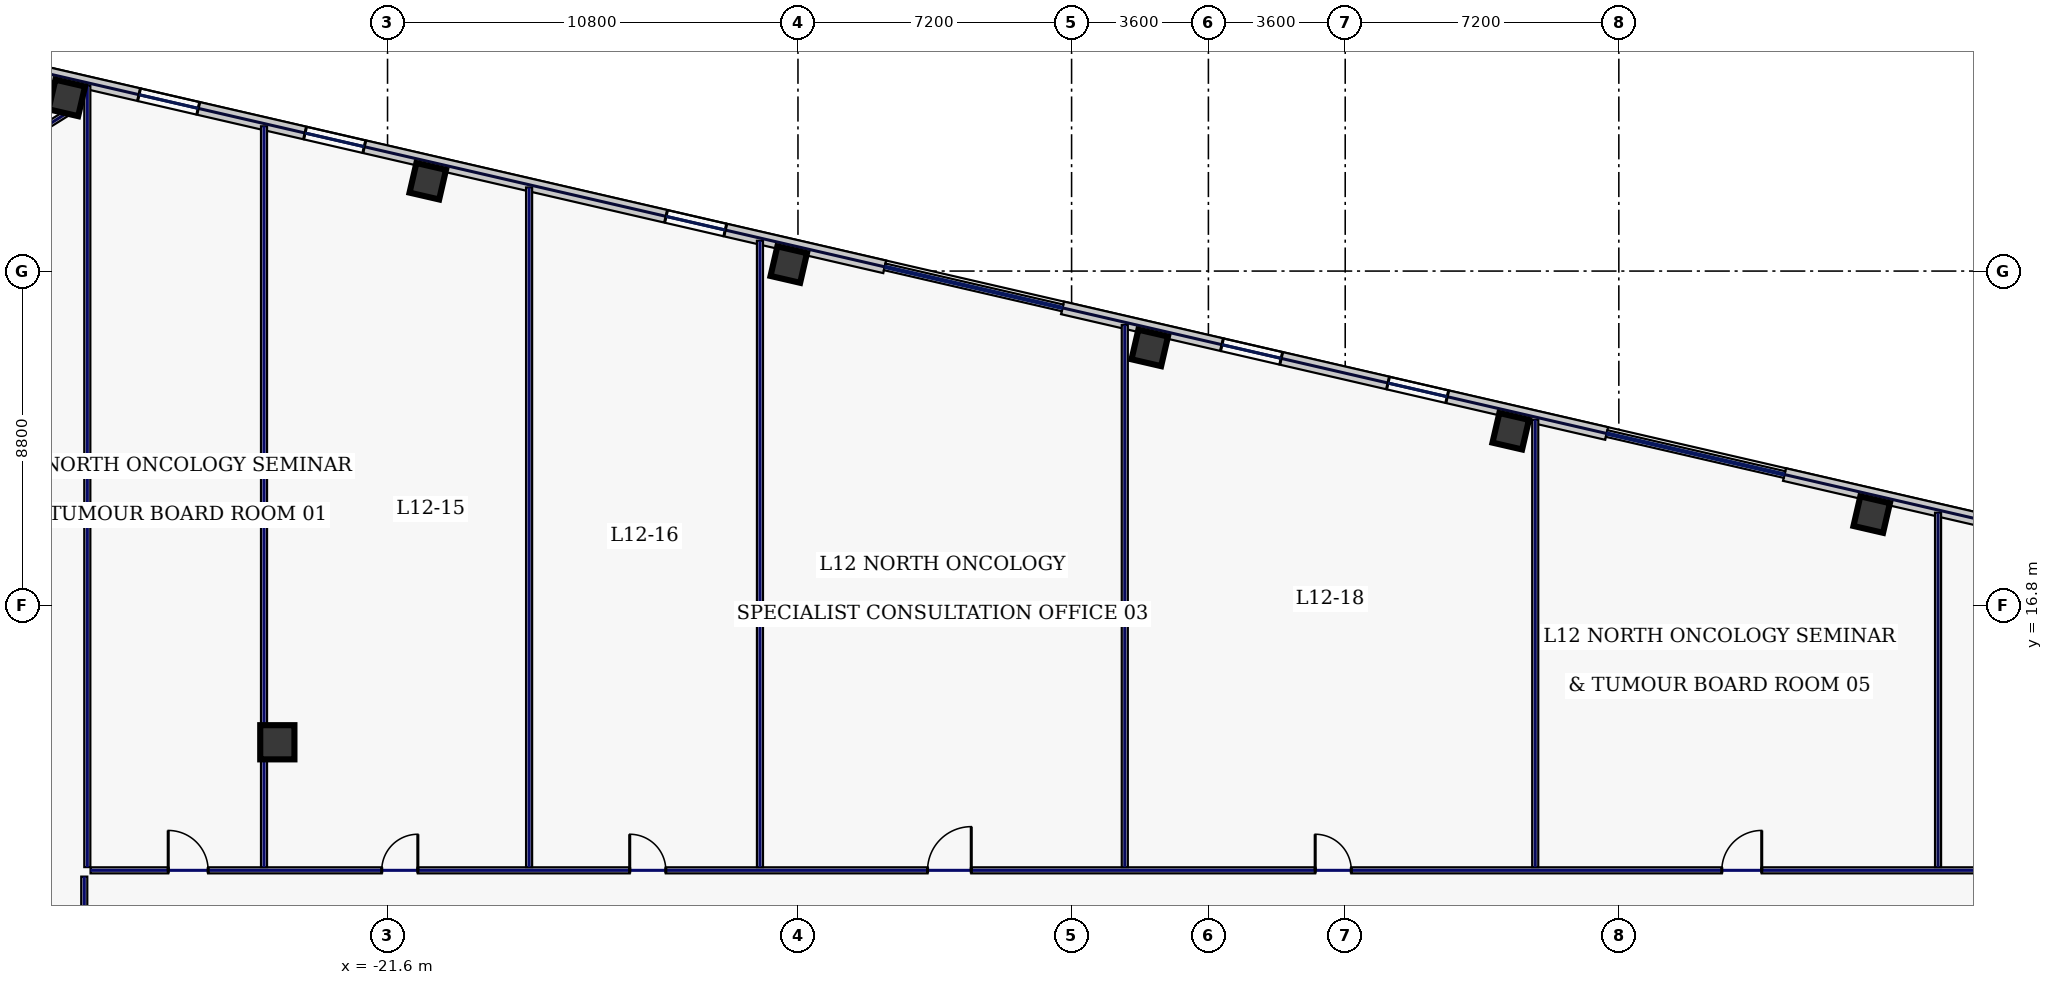
"""IFC4 building model, lengths in metres.
Left out: names, types, materials, properties, quantities, classifications, styles, units other than length and angle.
Written with IfcOpenShell. Run it as: python <this file> out.ifc"""

import sys

from ifc_helpers import new_model, si_unit, direction, frame, frame_2d, origin, origin_2d, place, context, subcontext, project, spatial, rectangle, hollow_rectangle, extrude, element, fill, save


model = new_model("IFC4")
c1 = context("Model", 3, precision=1e-05, world=origin(), true_north=direction((0.0, 1.0)))
c2 = subcontext(c1, "Body", "Model", "MODEL_VIEW")
j1 = project(units=[si_unit("LENGTHUNIT", "METRE"), si_unit("PLANEANGLEUNIT", "RADIAN")], contexts=[c1])
p1 = place(None, origin())
s1 = spatial("IfcSite", under=j1, at=p1, CompositionType="ELEMENT")
p2 = place(p1, origin())
s2 = spatial("IfcBuilding", under=s1, at=p2, CompositionType="ELEMENT")
p3 = place(p2, frame((0.0, 0.0, 59.4)))
s3 = spatial("IfcBuildingStorey", under=s2, at=p3, CompositionType="ELEMENT", Elevation=59.4)
p4 = place(p3, frame((-24.5, 13.2, 0.0), z_axis=(0.0, 0.0, 1.0), x_axis=(1.0, 0.0, 0.0)))
e1 = element("IfcColumn", 1, at=p4, inside=s3, PredefinedType="COLUMN", context=c2, shape_type="SweptSolid", body=[
    extrude(hollow_rectangle(XDim=0.9, YDim=0.9, WallThickness=0.04, at=origin_2d()), origin(), (0.0, 0.0, 1.0), 3.74),
])
for number, where, z_axis, x_axis in (
    (2, (17.454, 19.192, 0.0), (0.0, 0.0, 1.0), (0.974, -0.225, 0.0)),
    (3, (7.955, 21.385, 0.0), (0.0, 0.0, 1.0), (0.974, -0.225, 0.0)),
    (4, (-1.544, 23.578, 0.0), (0.0, 0.0, 1.0), (0.974, -0.225, 0.0)),
    (5, (-11.042, 25.771, 0.0), (0.0, 0.0, 1.0), (0.974, -0.225, 0.0)),
    (6, (-20.541, 27.964, 0.0), (0.0, 0.0, 1.0), (0.974, -0.225, 0.0)),
    (7, (-30.04, 30.156, 0.0), (0.0, 0.0, 1.0), (0.974, -0.225, 0.0)),
):
    element("IfcColumn", number, at=place(p3, frame(where, z_axis=z_axis, x_axis=x_axis)), inside=s3, PredefinedType="COLUMN", context=c2, shape_type="SweptSolid", body=[
        extrude(hollow_rectangle(XDim=0.8, YDim=0.8, WallThickness=0.036, at=origin_2d()), origin(), (0.0, 0.0, 1.0), 3.74),
    ])
p5 = place(p3, frame((37.229, 15.15, 0.0), z_axis=(0.0, 0.0, 1.0), x_axis=(-0.97436993772, 0.224951604723, 0.0)))
e8 = element("IfcWall", 8, at=p5, inside=s3, PredefinedType="STANDARD", context=c2, shape_type="SweptSolid", body=[
    extrude(rectangle(XDim=22.651, YDim=0.34, at=frame_2d((11.326, 0.0))), origin(), (0.0, 0.0, 1.0), 3.74),
])
p6 = place(p5, frame((2.512, 0.0, 0.22)))
e9 = element("IfcOpeningElement", 9, at=p6, cuts=e8, PredefinedType="OPENING", context=c2, shape_type="SweptSolid", body=[
    extrude(rectangle(XDim=1.6, YDim=1.2, at=frame_2d((0.8, 0.6))), frame((0.0, 0.18, 0.0), z_axis=(0.0, -1.0, 0.0), x_axis=(1.0, 0.0, 0.0)), (0.0, 0.0, 1.0), 0.36),
])
p7 = place(p3, frame((10.481, 21.325, 0.0), z_axis=(0.0, 0.0, 1.0), x_axis=(-0.974369353393, 0.2249541357, 0.0)))
e10 = element("IfcWall", 10, at=p7, inside=s3, PredefinedType="STANDARD", context=c2, shape_type="SweptSolid", body=[
    extrude(rectangle(XDim=14.697, YDim=0.34, at=frame_2d((7.349, 0.0))), origin(), (0.0, 0.0, 1.0), 3.74),
])
p8 = place(p7, frame((8.791, 0.0, 0.22)))
e11 = element("IfcOpeningElement", 11, at=p8, cuts=e10, PredefinedType="OPENING", context=c2, shape_type="SweptSolid", body=[
    extrude(rectangle(XDim=1.6, YDim=1.2, at=frame_2d((0.8, 0.6))), frame((0.0, 0.18, 0.0), z_axis=(0.0, -1.0, 0.0), x_axis=(1.0, 0.0, 0.0)), (0.0, 0.0, 1.0), 0.36),
])
p9 = place(p7, frame((4.306, 0.0, 0.22)))
e12 = element("IfcOpeningElement", 12, at=p9, cuts=e10, PredefinedType="OPENING", context=c2, shape_type="SweptSolid", body=[
    extrude(rectangle(XDim=1.6, YDim=1.2, at=frame_2d((0.8, 0.6))), frame((0.0, 0.18, 0.0), z_axis=(0.0, -1.0, 0.0), x_axis=(1.0, 0.0, 0.0)), (0.0, 0.0, 1.0), 0.36),
])
p10 = place(p3, frame((-8.517, 25.711, 0.0), z_axis=(0.0, 0.0, 1.0), x_axis=(-0.974372845456, 0.224939009598, 0.0)))
e13 = element("IfcWall", 13, at=p10, inside=s3, PredefinedType="STANDARD", context=c2, shape_type="SweptSolid", body=[
    extrude(rectangle(XDim=22.652, YDim=0.34, at=frame_2d((11.326, 0.0))), origin(), (0.0, 0.0, 1.0), 3.74),
])
p11 = place(p10, frame((18.539, 0.0, 0.22)))
e14 = element("IfcOpeningElement", 14, at=p11, cuts=e13, PredefinedType="OPENING", context=c2, shape_type="SweptSolid", body=[
    extrude(rectangle(XDim=1.6, YDim=1.2, at=frame_2d((0.8, 0.6))), frame((0.0, 0.18, 0.0), z_axis=(0.0, -1.0, 0.0), x_axis=(1.0, 0.0, 0.0)), (0.0, 0.0, 1.0), 0.36),
])
p12 = place(p10, frame((14.055, 0.0, 0.22)))
e15 = element("IfcOpeningElement", 15, at=p12, cuts=e13, PredefinedType="OPENING", context=c2, shape_type="SweptSolid", body=[
    extrude(rectangle(XDim=1.6, YDim=1.2, at=frame_2d((0.8, 0.6))), frame((0.0, 0.18, 0.0), z_axis=(0.0, -1.0, 0.0), x_axis=(1.0, 0.0, 0.0)), (0.0, 0.0, 1.0), 0.36),
])
p13 = place(p10, frame((4.306, 0.0, 0.22)))
e16 = element("IfcOpeningElement", 16, at=p13, cuts=e13, PredefinedType="OPENING", context=c2, shape_type="SweptSolid", body=[
    extrude(rectangle(XDim=1.6, YDim=1.2, at=frame_2d((0.8, 0.6))), frame((0.0, 0.18, 0.0), z_axis=(0.0, -1.0, 0.0), x_axis=(1.0, 0.0, 0.0)), (0.0, 0.0, 1.0), 0.36),
])
p14 = place(p3, frame((-29.86, 29.868, 0.0), z_axis=(0.0, 0.0, 1.0), x_axis=(-0.848043064089, -0.529927317139, 0.0)))
e17 = element("IfcWall", 17, at=p14, inside=s3, PredefinedType="PARTITIONING", context=c2, shape_type="SweptSolid", body=[
    extrude(rectangle(XDim=7.354, YDim=0.16, at=frame_2d((3.677, 0.0))), origin(), (0.0, 0.0, 1.0), 1.535),
])
p15 = place(p3, frame((-29.58, -9.615, 0.0), z_axis=(0.0, 0.0, 1.0), x_axis=(0.0, 1.0, 0.0)))
e18 = element("IfcWall", 18, at=p15, inside=s3, PredefinedType="PARTITIONING", context=c2, shape_type="SweptSolid", body=[
    extrude(rectangle(XDim=19.28, YDim=0.16, at=frame_2d((9.64, 0.0))), origin(), (0.0, 0.0, 1.0), 3.74),
])
p16 = place(p15, frame((1.969, 0.0, 0.0)))
e19 = element("IfcOpeningElement", 19, at=p16, cuts=e18, PredefinedType="OPENING", context=c2, shape_type="SweptSolid", body=[
    extrude(rectangle(XDim=0.95, YDim=2.2, at=frame_2d((0.475, 1.1))), frame((0.0, 0.09, 0.0), z_axis=(0.0, -1.0, 0.0), x_axis=(1.0, 0.0, 0.0)), (0.0, 0.0, 1.0), 0.18),
])
p17 = place(p15, frame((6.625, 0.0, 0.0)))
e20 = element("IfcOpeningElement", 20, at=p17, cuts=e18, PredefinedType="OPENING", context=c2, shape_type="SweptSolid", body=[
    extrude(rectangle(XDim=0.95, YDim=2.2, at=frame_2d((0.475, 1.1))), frame((0.0, 0.09, 0.0), z_axis=(0.0, -1.0, 0.0), x_axis=(1.0, 0.0, 0.0)), (0.0, 0.0, 1.0), 0.18),
])
p18 = place(p15, frame((11.825, 0.0, 0.0)))
e21 = element("IfcOpeningElement", 21, at=p18, cuts=e18, PredefinedType="OPENING", context=c2, shape_type="SweptSolid", body=[
    extrude(rectangle(XDim=0.95, YDim=2.2, at=frame_2d((0.475, 1.1))), frame((0.0, 0.09, 0.0), z_axis=(0.0, -1.0, 0.0), x_axis=(1.0, 0.0, 0.0)), (0.0, 0.0, 1.0), 0.18),
])
p19 = place(p15, frame((16.506, 0.0, 0.0)))
e22 = element("IfcOpeningElement", 22, at=p19, cuts=e18, PredefinedType="OPENING", context=c2, shape_type="SweptSolid", body=[
    extrude(rectangle(XDim=0.95, YDim=2.2, at=frame_2d((0.475, 1.1))), frame((0.0, 0.09, 0.0), z_axis=(0.0, -1.0, 0.0), x_axis=(1.0, 0.0, 0.0)), (0.0, 0.0, 1.0), 0.18),
])
p20 = place(p3, frame((-29.415, 9.83, 0.0), z_axis=(0.0, 0.0, 1.0), x_axis=(1.0, 0.0, 0.0)))
e23 = element("IfcWall", 23, at=p20, inside=s3, PredefinedType="PARTITIONING", context=c2, shape_type="SweptSolid", body=[
    extrude(rectangle(XDim=58.83, YDim=0.16, at=frame_2d((29.415, 0.0))), origin(), (0.0, 0.0, 1.0), 3.74),
])
p21 = place(p20, frame((2.044, 0.0, 0.0)))
e24 = element("IfcOpeningElement", 24, at=p21, cuts=e23, PredefinedType="OPENING", context=c2, shape_type="SweptSolid", body=[
    extrude(rectangle(XDim=1.05, YDim=2.2, at=frame_2d((0.525, 1.1))), frame((0.0, 0.09, 0.0), z_axis=(0.0, -1.0, 0.0), x_axis=(1.0, 0.0, 0.0)), (0.0, 0.0, 1.0), 0.18),
])
p22 = place(p20, frame((7.663, 0.0, 0.0)))
e25 = element("IfcOpeningElement", 25, at=p22, cuts=e23, PredefinedType="OPENING", context=c2, shape_type="SweptSolid", body=[
    extrude(rectangle(XDim=0.95, YDim=2.2, at=frame_2d((0.475, 1.1))), frame((0.0, 0.09, 0.0), z_axis=(0.0, -1.0, 0.0), x_axis=(1.0, 0.0, 0.0)), (0.0, 0.0, 1.0), 0.18),
])
p23 = place(p20, frame((14.188, 0.0, 0.0)))
e26 = element("IfcOpeningElement", 26, at=p23, cuts=e23, PredefinedType="OPENING", context=c2, shape_type="SweptSolid", body=[
    extrude(rectangle(XDim=0.95, YDim=2.2, at=frame_2d((0.475, 1.1))), frame((0.0, 0.09, 0.0), z_axis=(0.0, -1.0, 0.0), x_axis=(1.0, 0.0, 0.0)), (0.0, 0.0, 1.0), 0.18),
])
p24 = place(p20, frame((22.025, 0.0, 0.0)))
e27 = element("IfcOpeningElement", 27, at=p24, cuts=e23, PredefinedType="OPENING", context=c2, shape_type="SweptSolid", body=[
    extrude(rectangle(XDim=1.15, YDim=2.2, at=frame_2d((0.575, 1.1))), frame((0.0, 0.09, 0.0), z_axis=(0.0, -1.0, 0.0), x_axis=(1.0, 0.0, 0.0)), (0.0, 0.0, 1.0), 0.18),
])
p25 = place(p20, frame((32.225, 0.0, 0.0)))
e28 = element("IfcOpeningElement", 28, at=p25, cuts=e23, PredefinedType="OPENING", context=c2, shape_type="SweptSolid", body=[
    extrude(rectangle(XDim=0.95, YDim=2.2, at=frame_2d((0.475, 1.1))), frame((0.0, 0.09, 0.0), z_axis=(0.0, -1.0, 0.0), x_axis=(1.0, 0.0, 0.0)), (0.0, 0.0, 1.0), 0.18),
])
p26 = place(p20, frame((42.925, 0.0, 0.0)))
e29 = element("IfcOpeningElement", 29, at=p26, cuts=e23, PredefinedType="OPENING", context=c2, shape_type="SweptSolid", body=[
    extrude(rectangle(XDim=1.05, YDim=2.2, at=frame_2d((0.525, 1.1))), frame((0.0, 0.09, 0.0), z_axis=(0.0, -1.0, 0.0), x_axis=(1.0, 0.0, 0.0)), (0.0, 0.0, 1.0), 0.18),
])
p27 = place(p20, frame((51.65, 0.0, 0.0)))
e30 = element("IfcOpeningElement", 30, at=p27, cuts=e23, PredefinedType="OPENING", context=c2, shape_type="SweptSolid", body=[
    extrude(rectangle(XDim=0.95, YDim=2.2, at=frame_2d((0.475, 1.1))), frame((0.0, 0.09, 0.0), z_axis=(0.0, -1.0, 0.0), x_axis=(1.0, 0.0, 0.0)), (0.0, 0.0, 1.0), 0.18),
])
p28 = place(p20, frame((56.006, 0.0, 0.0)))
e31 = element("IfcOpeningElement", 31, at=p28, cuts=e23, PredefinedType="OPENING", context=c2, shape_type="SweptSolid", body=[
    extrude(rectangle(XDim=0.95, YDim=2.2, at=frame_2d((0.475, 1.1))), frame((0.0, 0.09, 0.0), z_axis=(0.0, -1.0, 0.0), x_axis=(1.0, 0.0, 0.0)), (0.0, 0.0, 1.0), 0.18),
])
p29 = place(p3, frame((-29.5, 9.915, 0.0), z_axis=(0.0, 0.0, 1.0), x_axis=(0.0, 1.0, 0.0)))
e32 = element("IfcWall", 32, at=p29, inside=s3, PredefinedType="PARTITIONING", context=c2, shape_type="SweptSolid", body=[
    extrude(rectangle(XDim=20.569, YDim=0.16, at=frame_2d((10.284, 0.0))), origin(), (0.0, 0.0, 1.0), 3.74),
])
p30 = place(p3, frame((-24.85, 9.915, 0.0), z_axis=(0.0, 0.0, 1.0), x_axis=(0.0, 1.0, 0.0)))
e33 = element("IfcWall", 33, at=p30, inside=s3, PredefinedType="PARTITIONING", context=c2, shape_type="SweptSolid", body=[
    extrude(rectangle(XDim=19.495, YDim=0.16, at=frame_2d((9.748, 0.0))), origin(), (0.0, 0.0, 1.0), 3.74),
])
p31 = place(p3, frame((-11.8, 9.915, 0.0), z_axis=(0.0, 0.0, 1.0), x_axis=(0.0, 1.0, 0.0)))
e34 = element("IfcWall", 34, at=p31, inside=s3, PredefinedType="PARTITIONING", context=c2, shape_type="SweptSolid", body=[
    extrude(rectangle(XDim=16.482, YDim=0.16, at=frame_2d((8.241, 0.0))), origin(), (0.0, 0.0, 1.0), 3.74),
])
p32 = place(p3, frame((-2.2, 9.915, 0.0), z_axis=(0.0, 0.0, 1.0), x_axis=(0.0, 1.0, 0.0)))
e35 = element("IfcWall", 35, at=p32, inside=s3, PredefinedType="PARTITIONING", context=c2, shape_type="SweptSolid", body=[
    extrude(rectangle(XDim=14.266, YDim=0.16, at=frame_2d((7.133, 0.0))), origin(), (0.0, 0.0, 1.0), 3.235),
])
p33 = place(p3, frame((8.6, 9.915, 0.0), z_axis=(0.0, 0.0, 1.0), x_axis=(0.0, 1.0, 0.0)))
e36 = element("IfcWall", 36, at=p33, inside=s3, PredefinedType="PARTITIONING", context=c2, shape_type="SweptSolid", body=[
    extrude(rectangle(XDim=11.772, YDim=0.16, at=frame_2d((5.886, 0.0))), origin(), (0.0, 0.0, 1.0), 3.235),
])
p34 = place(p3, frame((19.2, 9.915, 0.0), z_axis=(0.0, 0.0, 1.0), x_axis=(0.0, 1.0, 0.0)))
e37 = element("IfcWall", 37, at=p34, inside=s3, PredefinedType="PARTITIONING", context=c2, shape_type="SweptSolid", body=[
    extrude(rectangle(XDim=9.325, YDim=0.16, at=frame_2d((4.663, 0.0))), origin(), (0.0, 0.0, 1.0), 1.535),
])
p35 = place(p3, frame((-17.875, 9.915, 0.0), z_axis=(0.0, 0.0, 1.0), x_axis=(0.0, 1.0, 0.0)))
e38 = element("IfcWall", 38, at=p35, inside=s3, PredefinedType="PARTITIONING", context=c2, shape_type="SweptSolid", body=[
    extrude(rectangle(XDim=17.885, YDim=0.16, at=frame_2d((8.942, 0.0))), origin(), (0.0, 0.0, 1.0), 3.74),
])
p36 = place(p8, origin())
e39 = element("IfcWindow", 39, at=p36, inside=s3, PartitioningType="SINGLE_PANEL", PredefinedType="WINDOW", context=c2, shape_type="SweptSolid", body=[
    extrude(rectangle(XDim=1.6, YDim=1.2, at=frame_2d((0.8, 0.6))), frame((0.0, 0.03, 0.0), z_axis=(0.0, -1.0, 0.0), x_axis=(1.0, 0.0, 0.0)), (0.0, 0.0, 1.0), 0.06),
])
fill(e11, e39)
p37 = place(p9, origin())
e40 = element("IfcWindow", 40, at=p37, inside=s3, PartitioningType="SINGLE_PANEL", PredefinedType="WINDOW", context=c2, shape_type="SweptSolid", body=[
    extrude(rectangle(XDim=1.6, YDim=1.2, at=frame_2d((0.8, 0.6))), frame((0.0, 0.03, 0.0), z_axis=(0.0, -1.0, 0.0), x_axis=(1.0, 0.0, 0.0)), (0.0, 0.0, 1.0), 0.06),
])
fill(e12, e40)
p38 = place(p11, origin())
e41 = element("IfcWindow", 41, at=p38, inside=s3, PartitioningType="SINGLE_PANEL", PredefinedType="WINDOW", context=c2, shape_type="SweptSolid", body=[
    extrude(rectangle(XDim=1.6, YDim=1.2, at=frame_2d((0.8, 0.6))), frame((0.0, 0.03, 0.0), z_axis=(0.0, -1.0, 0.0), x_axis=(1.0, 0.0, 0.0)), (0.0, 0.0, 1.0), 0.06),
])
fill(e14, e41)
p39 = place(p12, origin())
e42 = element("IfcWindow", 42, at=p39, inside=s3, PartitioningType="SINGLE_PANEL", PredefinedType="WINDOW", context=c2, shape_type="SweptSolid", body=[
    extrude(rectangle(XDim=1.6, YDim=1.2, at=frame_2d((0.8, 0.6))), frame((0.0, 0.03, 0.0), z_axis=(0.0, -1.0, 0.0), x_axis=(1.0, 0.0, 0.0)), (0.0, 0.0, 1.0), 0.06),
])
fill(e15, e42)
p40 = place(p13, origin())
e43 = element("IfcWindow", 43, at=p40, inside=s3, PartitioningType="SINGLE_PANEL", PredefinedType="WINDOW", context=c2, shape_type="SweptSolid", body=[
    extrude(rectangle(XDim=1.6, YDim=1.2, at=frame_2d((0.8, 0.6))), frame((0.0, 0.03, 0.0), z_axis=(0.0, -1.0, 0.0), x_axis=(1.0, 0.0, 0.0)), (0.0, 0.0, 1.0), 0.06),
])
fill(e16, e43)
p41 = place(p21, origin())
e44 = element("IfcDoor", 44, at=p41, inside=s3, OperationType="SINGLE_SWING_LEFT", PredefinedType="DOOR", context=c2, shape_type="SweptSolid", body=[
    extrude(rectangle(XDim=1.05, YDim=2.2, at=frame_2d((0.525, 1.1))), frame((0.0, 0.025, 0.0), z_axis=(0.0, -1.0, 0.0), x_axis=(1.0, 0.0, 0.0)), (0.0, 0.0, 1.0), 0.05),
])
fill(e24, e44)
p42 = place(p22, origin())
e45 = element("IfcDoor", 45, at=p42, inside=s3, OperationType="SINGLE_SWING_RIGHT", PredefinedType="DOOR", context=c2, shape_type="SweptSolid", body=[
    extrude(rectangle(XDim=0.95, YDim=2.2, at=frame_2d((0.475, 1.1))), frame((0.0, 0.025, 0.0), z_axis=(0.0, -1.0, 0.0), x_axis=(1.0, 0.0, 0.0)), (0.0, 0.0, 1.0), 0.05),
])
fill(e25, e45)
p43 = place(p23, origin())
e46 = element("IfcDoor", 46, at=p43, inside=s3, OperationType="SINGLE_SWING_LEFT", PredefinedType="DOOR", context=c2, shape_type="SweptSolid", body=[
    extrude(rectangle(XDim=0.95, YDim=2.2, at=frame_2d((0.475, 1.1))), frame((0.0, 0.025, 0.0), z_axis=(0.0, -1.0, 0.0), x_axis=(1.0, 0.0, 0.0)), (0.0, 0.0, 1.0), 0.05),
])
fill(e26, e46)
p44 = place(p24, origin())
e47 = element("IfcDoor", 47, at=p44, inside=s3, OperationType="SINGLE_SWING_RIGHT", PredefinedType="DOOR", context=c2, shape_type="SweptSolid", body=[
    extrude(rectangle(XDim=1.15, YDim=2.2, at=frame_2d((0.575, 1.1))), frame((0.0, 0.025, 0.0), z_axis=(0.0, -1.0, 0.0), x_axis=(1.0, 0.0, 0.0)), (0.0, 0.0, 1.0), 0.05),
])
fill(e27, e47)
p45 = place(p25, origin())
e48 = element("IfcDoor", 48, at=p45, inside=s3, OperationType="SINGLE_SWING_LEFT", PredefinedType="DOOR", context=c2, shape_type="SweptSolid", body=[
    extrude(rectangle(XDim=0.95, YDim=2.2, at=frame_2d((0.475, 1.1))), frame((0.0, 0.025, 0.0), z_axis=(0.0, -1.0, 0.0), x_axis=(1.0, 0.0, 0.0)), (0.0, 0.0, 1.0), 0.05),
])
fill(e28, e48)
p46 = place(p26, origin())
e49 = element("IfcDoor", 49, at=p46, inside=s3, OperationType="SINGLE_SWING_RIGHT", PredefinedType="DOOR", context=c2, shape_type="SweptSolid", body=[
    extrude(rectangle(XDim=1.05, YDim=2.2, at=frame_2d((0.525, 1.1))), frame((0.0, 0.025, 0.0), z_axis=(0.0, -1.0, 0.0), x_axis=(1.0, 0.0, 0.0)), (0.0, 0.0, 1.0), 0.05),
])
fill(e29, e49)
save(model, sys.argv[1])
